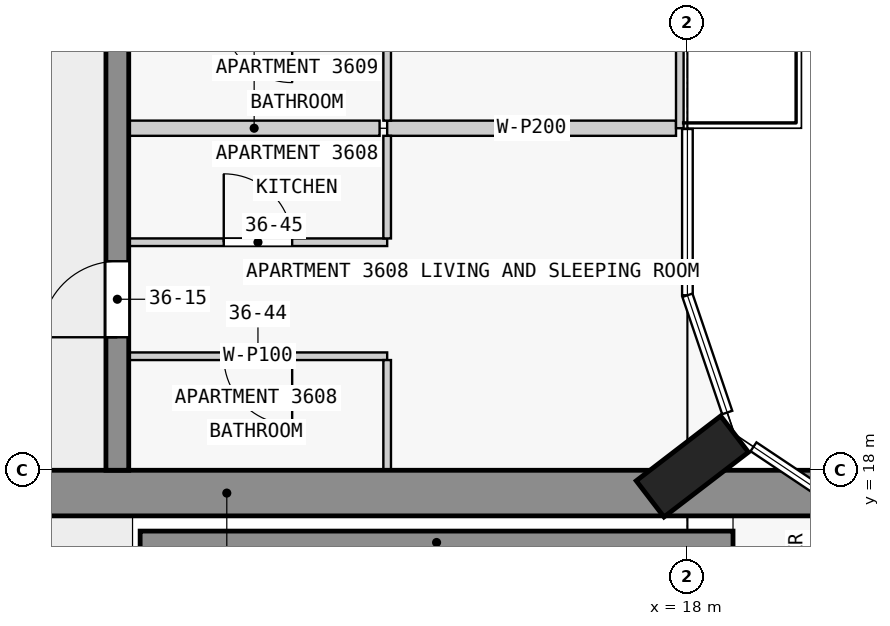
"""IFC4 building model, lengths in metres.
Left out: names, types, materials, properties, quantities, classifications, styles, units other than length and angle.
Written with IfcOpenShell. Run it as: python <this file> out.ifc"""

import sys

from ifc_helpers import new_model, si_unit, direction, frame, frame_2d, origin, origin_2d, place, context, subcontext, project, spatial, rectangle, extrude, element, fill, save


model = new_model("IFC4")
c1 = context("Model", 3, precision=1e-05, world=origin(), true_north=direction((0.0, 1.0)))
c2 = subcontext(c1, "Body", "Model", "MODEL_VIEW")
j1 = project(units=[si_unit("LENGTHUNIT", "METRE"), si_unit("PLANEANGLEUNIT", "RADIAN")], contexts=[c1])
p1 = place(None, origin())
s1 = spatial("IfcSite", under=j1, at=p1, CompositionType="ELEMENT")
p2 = place(p1, origin())
s2 = spatial("IfcBuilding", under=s1, at=p2, CompositionType="ELEMENT")
p3 = place(p2, frame((0.0, 0.0, 142.9)))
s3 = spatial("IfcBuildingStorey", under=s2, at=p3, CompositionType="ELEMENT", Elevation=142.9)
p4 = place(p3, frame((18.065, 18.05, 0.0), z_axis=(0.0, 0.0, 1.0), x_axis=(-0.608810846443, 0.793315418515, 0.0)))
e1 = element("IfcColumn", 1, at=p4, inside=s3, PredefinedType="COLUMN", context=c2, shape_type="SweptSolid", body=[
    extrude(rectangle(XDim=0.6, YDim=1.4, at=origin_2d()), origin(), (0.0, 0.0, 1.0), 3.5),
])
p5 = place(p3, frame((1.38, 17.7, 0.0), z_axis=(0.0, 0.0, 1.0), x_axis=(1.0, 0.0, 0.0)))
e2 = element("IfcWall", 2, at=p5, inside=s3, PredefinedType="SHEAR", context=c2, shape_type="SweptSolid", body=[
    extrude(rectangle(XDim=21.12, YDim=0.6, at=frame_2d((10.56, 0.0))), origin(), (0.0, 0.0, 1.0), 3.25),
])
p6 = place(p5, frame((6.4, 0.0, 0.0)))
e3 = element("IfcOpeningElement", 3, at=p6, cuts=e2, PredefinedType="OPENING", context=c2, shape_type="SweptSolid", body=[
    extrude(rectangle(XDim=1.8, YDim=2.1, at=frame_2d((0.9, 1.05))), frame((0.0, 0.31, 0.0), z_axis=(0.0, -1.0, 0.0), x_axis=(1.0, 0.0, 0.0)), (0.0, 0.0, 1.0), 0.62),
])
p7 = place(p3, frame((10.8, 17.05, 0.0), z_axis=(0.0, 0.0, 1.0), x_axis=(1.0, 0.0, 0.0)))
e4 = element("IfcWall", 4, at=p7, inside=s3, PredefinedType="SHEAR", context=c2, shape_type="SweptSolid", body=[
    extrude(rectangle(XDim=7.8, YDim=0.3, at=frame_2d((3.9, 0.0))), origin(), (0.0, 0.0, 1.0), 3.25),
])
p8 = place(p3, frame((10.5, 18.0, 0.0), z_axis=(0.0, 0.0, 1.0), x_axis=(0.0, 1.0, 0.0)))
e5 = element("IfcWall", 5, at=p8, inside=s3, PredefinedType="SHEAR", context=c2, shape_type="SweptSolid", body=[
    extrude(rectangle(XDim=27.0, YDim=0.3, at=frame_2d((13.5, 0.0))), origin(), (0.0, 0.0, 1.0), 3.25),
])
p9 = place(p8, frame((1.75, 0.0, 0.0)))
e6 = element("IfcOpeningElement", 6, at=p9, cuts=e5, PredefinedType="OPENING", context=c2, shape_type="SweptSolid", body=[
    extrude(rectangle(XDim=1.0, YDim=2.1, at=frame_2d((0.5, 1.05))), frame((0.0, 0.16, 0.0), z_axis=(0.0, -1.0, 0.0), x_axis=(1.0, 0.0, 0.0)), (0.0, 0.0, 1.0), 0.32),
])
p10 = place(p8, frame((6.25, 0.0, 0.0)))
e7 = element("IfcOpeningElement", 7, at=p10, cuts=e5, PredefinedType="OPENING", context=c2, shape_type="SweptSolid", body=[
    extrude(rectangle(XDim=1.0, YDim=2.1, at=frame_2d((0.5, 1.05))), frame((0.0, 0.16, 0.0), z_axis=(0.0, -1.0, 0.0), x_axis=(1.0, 0.0, 0.0)), (0.0, 0.0, 1.0), 0.32),
])
p11 = place(p8, frame((10.35, 0.0, 0.0)))
e8 = element("IfcOpeningElement", 8, at=p11, cuts=e5, PredefinedType="OPENING", context=c2, shape_type="SweptSolid", body=[
    extrude(rectangle(XDim=1.8, YDim=2.1, at=frame_2d((0.9, 1.05))), frame((0.0, 0.16, 0.0), z_axis=(0.0, -1.0, 0.0), x_axis=(1.0, 0.0, 0.0)), (0.0, 0.0, 1.0), 0.32),
])
p12 = place(p8, frame((15.25, 0.0, 0.0)))
e9 = element("IfcOpeningElement", 9, at=p12, cuts=e5, PredefinedType="OPENING", context=c2, shape_type="SweptSolid", body=[
    extrude(rectangle(XDim=1.0, YDim=2.1, at=frame_2d((0.5, 1.05))), frame((0.0, 0.16, 0.0), z_axis=(0.0, -1.0, 0.0), x_axis=(1.0, 0.0, 0.0)), (0.0, 0.0, 1.0), 0.32),
])
p13 = place(p8, frame((21.35, 0.0, 0.0)))
e10 = element("IfcOpeningElement", 10, at=p13, cuts=e5, PredefinedType="OPENING", context=c2, shape_type="SweptSolid", body=[
    extrude(rectangle(XDim=1.0, YDim=2.1, at=frame_2d((0.5, 1.05))), frame((0.0, 0.16, 0.0), z_axis=(0.0, -1.0, 0.0), x_axis=(1.0, 0.0, 0.0)), (0.0, 0.0, 1.0), 0.32),
])
p14 = place(p3, frame((17.9, 27.0, 0.0), z_axis=(0.0, 0.0, 1.0), x_axis=(0.0, -1.0, 0.0)))
e11 = element("IfcWall", 11, at=p14, inside=s3, PredefinedType="STANDARD", context=c2, shape_type="SweptSolid", body=[
    extrude(rectangle(XDim=4.5, YDim=0.1, at=frame_2d((2.25, 0.0))), origin(), (0.0, 0.0, 1.0), 3.25),
])
p15 = place(p14, frame((1.05, 0.0, 0.0)))
e12 = element("IfcOpeningElement", 12, at=p15, cuts=e11, PredefinedType="OPENING", context=c2, shape_type="SweptSolid", body=[
    extrude(rectangle(XDim=2.4, YDim=2.4, at=frame_2d((1.2, 1.2))), frame((0.0, 0.06, 0.0), z_axis=(0.0, -1.0, 0.0), x_axis=(1.0, 0.0, 0.0)), (0.0, 0.0, 1.0), 0.12),
])
p16 = place(p3, frame((14.05, 19.5, 0.0), z_axis=(0.0, 0.0, 1.0), x_axis=(-1.0, 0.0, 0.0)))
e13 = element("IfcWall", 13, at=p16, inside=s3, PredefinedType="PARTITIONING", context=c2, shape_type="SweptSolid", body=[
    extrude(rectangle(XDim=3.4, YDim=0.1, at=frame_2d((1.7, 0.0))), origin(), (0.0, 0.0, 1.0), 3.25),
])
p17 = place(p16, frame((1.25, 0.0, 0.0)))
e14 = element("IfcOpeningElement", 14, at=p17, cuts=e13, PredefinedType="OPENING", context=c2, shape_type="SweptSolid", body=[
    extrude(rectangle(XDim=0.9, YDim=2.1, at=frame_2d((0.45, 1.05))), frame((0.0, 0.06, 0.0), z_axis=(0.0, -1.0, 0.0), x_axis=(1.0, 0.0, 0.0)), (0.0, 0.0, 1.0), 0.12),
])
p18 = place(p3, frame((10.65, 21.0, 0.0), z_axis=(0.0, 0.0, 1.0), x_axis=(1.0, 0.0, 0.0)))
e15 = element("IfcWall", 15, at=p18, inside=s3, PredefinedType="PARTITIONING", context=c2, shape_type="SweptSolid", body=[
    extrude(rectangle(XDim=3.4, YDim=0.1, at=frame_2d((1.7, 0.0))), origin(), (0.0, 0.0, 1.0), 3.25),
])
p19 = place(p18, frame((1.25, 0.0, 0.0)))
e16 = element("IfcOpeningElement", 16, at=p19, cuts=e15, PredefinedType="OPENING", context=c2, shape_type="SweptSolid", body=[
    extrude(rectangle(XDim=0.9, YDim=2.1, at=frame_2d((0.45, 1.05))), frame((0.0, 0.06, 0.0), z_axis=(0.0, -1.0, 0.0), x_axis=(1.0, 0.0, 0.0)), (0.0, 0.0, 1.0), 0.12),
])
p20 = place(p3, frame((13.95, 22.5, 0.0), z_axis=(0.0, 0.0, 1.0), x_axis=(-1.0, 0.0, 0.0)))
e17 = element("IfcWall", 17, at=p20, inside=s3, PredefinedType="PARTITIONING", context=c2, shape_type="SweptSolid", body=[
    extrude(rectangle(XDim=3.3, YDim=0.2, at=frame_2d((1.65, 0.0))), origin(), (0.0, 0.0, 1.0), 3.25),
])
p21 = place(p3, frame((14.05, 22.5, 0.0), z_axis=(0.0, 0.0, 1.0), x_axis=(1.0, 0.0, 0.0)))
e18 = element("IfcWall", 18, at=p21, inside=s3, PredefinedType="PARTITIONING", context=c2, shape_type="SweptSolid", body=[
    extrude(rectangle(XDim=3.8, YDim=0.2, at=frame_2d((1.9, 0.0))), origin(), (0.0, 0.0, 1.0), 3.25),
])
p22 = place(p3, frame((14.05, 18.0, 0.0), z_axis=(0.0, 0.0, 1.0), x_axis=(0.0, 1.0, 0.0)))
e19 = element("IfcWall", 19, at=p22, inside=s3, PredefinedType="PARTITIONING", context=c2, shape_type="SweptSolid", body=[
    extrude(rectangle(XDim=1.45, YDim=0.1, at=frame_2d((0.725, 0.0))), origin(), (0.0, 0.0, 1.0), 3.25),
])
for number, where, z_axis, x_axis in (
    (20, (14.05, 21.05, 0.0), (0.0, 0.0, 1.0), (0.0, 1.0, 0.0)),
    (21, (14.05, 22.6, 0.0), (0.0, 0.0, 1.0), (0.0, 1.0, 0.0)),
):
    element("IfcWall", number, at=place(p3, frame(where, z_axis=z_axis, x_axis=x_axis)), inside=s3, PredefinedType="PARTITIONING", context=c2, shape_type="SweptSolid", body=[
        extrude(rectangle(XDim=1.35, YDim=0.1, at=frame_2d((0.675, 0.0))), origin(), (0.0, 0.0, 1.0), 3.25),
    ])
p23 = place(p9, origin())
e22 = element("IfcDoor", 22, at=p23, inside=s3, OperationType="SINGLE_SWING_LEFT", PredefinedType="DOOR", context=c2, shape_type="SweptSolid", body=[
    extrude(rectangle(XDim=1.0, YDim=2.1, at=frame_2d((0.5, 1.05))), frame((0.0, 0.025, 0.0), z_axis=(0.0, -1.0, 0.0), x_axis=(1.0, 0.0, 0.0)), (0.0, 0.0, 1.0), 0.05),
])
fill(e6, e22)
p24 = place(p17, origin())
e23 = element("IfcDoor", 23, at=p24, inside=s3, OperationType="SINGLE_SWING_LEFT", PredefinedType="DOOR", context=c2, shape_type="SweptSolid", body=[
    extrude(rectangle(XDim=0.9, YDim=2.1, at=frame_2d((0.45, 1.05))), frame((0.0, 0.025, 0.0), z_axis=(0.0, -1.0, 0.0), x_axis=(1.0, 0.0, 0.0)), (0.0, 0.0, 1.0), 0.05),
])
fill(e14, e23)
p25 = place(p19, origin())
e24 = element("IfcDoor", 24, at=p25, inside=s3, OperationType="SINGLE_SWING_LEFT", PredefinedType="DOOR", context=c2, shape_type="SweptSolid", body=[
    extrude(rectangle(XDim=0.9, YDim=2.1, at=frame_2d((0.45, 1.05))), frame((0.0, 0.025, 0.0), z_axis=(0.0, -1.0, 0.0), x_axis=(1.0, 0.0, 0.0)), (0.0, 0.0, 1.0), 0.05),
])
fill(e16, e24)
save(model, sys.argv[1])
